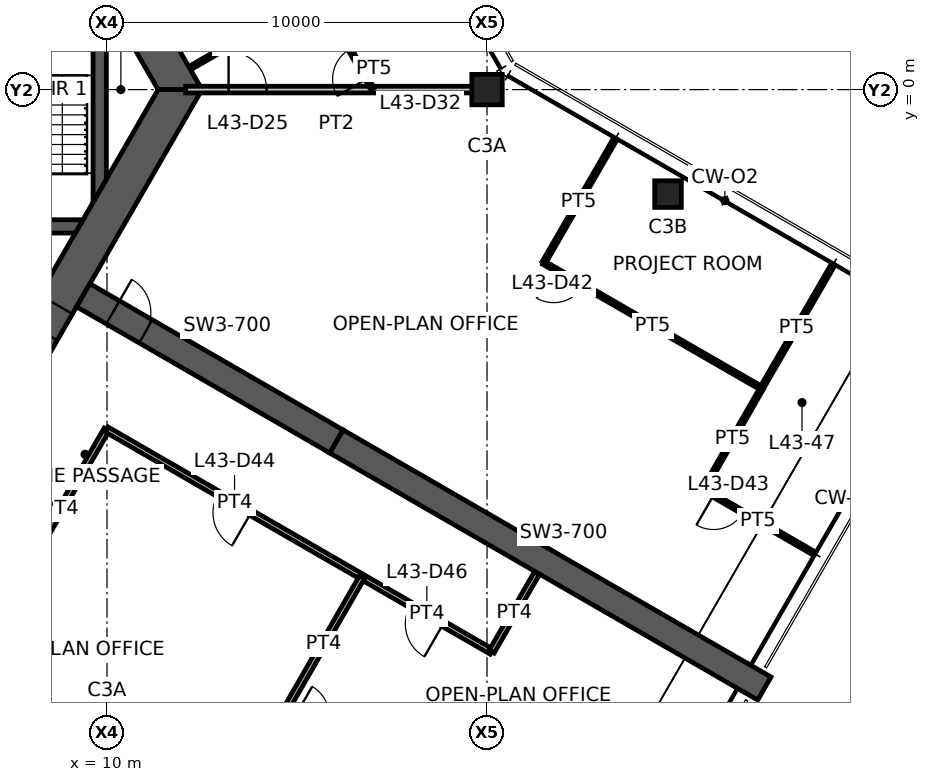
"""IFC4 building model, lengths in metres.
Left out: names, types, materials, properties, quantities, classifications, styles, units other than length and angle.
Written with IfcOpenShell. Run it as: python <this file> out.ifc"""

import sys

from ifc_helpers import new_model, si_unit, direction, frame, frame_2d, origin, origin_2d, place, context, subcontext, project, spatial, polyline, rectangle, hollow_rectangle, outline, extrude, element, fill, save


model = new_model("IFC4")
c1 = context("Model", 3, precision=1e-05, world=origin(), true_north=direction((0.0, 1.0)))
c2 = subcontext(c1, "Body", "Model", "MODEL_VIEW")
j1 = project(units=[si_unit("LENGTHUNIT", "METRE"), si_unit("PLANEANGLEUNIT", "RADIAN")], contexts=[c1])
p1 = place(None, origin())
s1 = spatial("IfcSite", under=j1, at=p1, CompositionType="ELEMENT")
p2 = place(p1, origin())
s2 = spatial("IfcBuilding", under=s1, at=p2, CompositionType="ELEMENT")
p3 = place(p2, frame((0.0, 0.0, 172.1)))
s3 = spatial("IfcBuildingStorey", under=s2, at=p3, CompositionType="ELEMENT", Elevation=172.1)
p4 = place(p3, frame((20.0, 0.0, 0.0), z_axis=(0.0, 0.0, 1.0), x_axis=(1.0, 0.0, 0.0)))
e1 = element("IfcColumn", 1, at=p4, inside=s3, PredefinedType="COLUMN", context=c2, shape_type="SweptSolid", body=[
    extrude(hollow_rectangle(XDim=0.8, YDim=0.8, WallThickness=0.045, at=origin_2d()), origin(), (0.0, 0.0, 1.0), 3.9),
])
p5 = place(p3, frame((24.763, -2.75, 0.0), z_axis=(0.0, 0.0, 1.0), x_axis=(1.0, 0.0, 0.0)))
e2 = element("IfcColumn", 2, at=p5, inside=s3, PredefinedType="COLUMN", context=c2, shape_type="SweptSolid", body=[
    extrude(hollow_rectangle(XDim=0.7, YDim=0.7, WallThickness=0.036, at=origin_2d()), origin(), (0.0, 0.0, 1.0), 3.9),
])
p6 = place(p3, frame((11.922, 0.0, 0.0), z_axis=(0.0, 0.0, 1.0), x_axis=(-0.500004296715, 0.866022923061, 0.0)))
e3 = element("IfcWall", 3, at=p6, inside=s3, PredefinedType="SHEAR", context=c2, shape_type="SweptSolid", body=[
    extrude(outline(polyline([(-0.289, -0.5), (5.835, -0.5), (6.635, -0.5), (12.211, -0.5), (11.634, 0.5), (6.635, 0.5), (5.835, 0.5), (0.289, 0.5), (-0.289, -0.5)])), origin(), (0.0, 0.0, 1.0), 3.9),
])
p7 = place(p6, frame((5.835, 0.0, 0.0)))
e4 = element("IfcOpeningElement", 4, at=p7, cuts=e3, PredefinedType="OPENING", context=c2, shape_type="SweptSolid", body=[
    extrude(rectangle(XDim=0.8, YDim=2.1, at=frame_2d((0.4, 1.05))), frame((0.0, 0.51, 0.0), z_axis=(0.0, -1.0, 0.0), x_axis=(1.0, 0.0, 0.0)), (0.0, 0.0, 1.0), 1.02),
])
p8 = place(p3, frame((5.961, -10.325, 0.0), z_axis=(0.0, 0.0, 1.0), x_axis=(0.500004296715, 0.866022923061, 0.0)))
e5 = element("IfcWall", 5, at=p8, inside=s3, PredefinedType="SHEAR", context=c2, shape_type="SweptSolid", body=[
    extrude(outline(polyline([(-0.289, -0.5), (4.594, -0.5), (5.394, -0.5), (12.211, -0.5), (11.634, 0.5), (5.394, 0.5), (4.594, 0.5), (0.289, 0.5), (-0.289, -0.5)])), origin(), (0.0, 0.0, 1.0), 3.9),
])
p9 = place(p8, frame((4.594, 0.0, 0.0)))
e6 = element("IfcOpeningElement", 6, at=p9, cuts=e5, PredefinedType="OPENING", context=c2, shape_type="SweptSolid", body=[
    extrude(rectangle(XDim=0.8, YDim=2.1, at=frame_2d((0.4, 1.05))), frame((0.0, 0.51, 0.0), z_axis=(0.0, -1.0, 0.0), x_axis=(1.0, 0.0, 0.0)), (0.0, 0.0, 1.0), 1.02),
])
p10 = place(p3, frame((9.375, -5.413, 0.0), z_axis=(0.0, 0.0, 1.0), x_axis=(0.866032377459, -0.499987921047, 0.0)))
e7 = element("IfcWall", 7, at=p10, inside=s3, PredefinedType="SHEAR", context=c2, shape_type="SweptSolid", body=[
    extrude(rectangle(XDim=7.696, YDim=0.7, at=frame_2d((3.848, 0.0))), origin(), (0.0, 0.0, 1.0), 3.9),
])
p11 = place(p10, frame((0.9, 0.0, 0.0)))
e8 = element("IfcOpeningElement", 8, at=p11, cuts=e7, PredefinedType="OPENING", context=c2, shape_type="SweptSolid", body=[
    extrude(rectangle(XDim=1.0, YDim=2.1, at=frame_2d((0.5, 1.05))), frame((0.0, 0.36, 0.0), z_axis=(0.0, -1.0, 0.0), x_axis=(1.0, 0.0, 0.0)), (0.0, 0.0, 1.0), 0.72),
])
p12 = place(p3, frame((16.039, -9.26, 0.0), z_axis=(0.0, 0.0, 1.0), x_axis=(0.866024837091, -0.50000098154, 0.0)))
e9 = element("IfcWall", 9, at=p12, inside=s3, PredefinedType="SHEAR", context=c2, shape_type="SweptSolid", body=[
    extrude(rectangle(XDim=13.0, YDim=0.7, at=frame_2d((6.5, 0.0))), origin(), (0.0, 0.0, 1.0), 3.9),
])
p13 = place(p3, frame((1.425, -3.6, 0.0), z_axis=(0.0, 0.0, 1.0), x_axis=(1.0, 0.0, 0.0)))
e10 = element("IfcWall", 10, at=p13, inside=s3, PredefinedType="SHEAR", context=c2, shape_type="SweptSolid", body=[
    extrude(outline(polyline([(0.0, -0.175), (1.075, -0.175), (2.175, -0.175), (7.74, -0.175), (7.942, 0.175), (2.175, 0.175), (1.075, 0.175), (0.0, 0.175), (0.0, -0.175)])), origin(), (0.0, 0.0, 1.0), 3.9),
])
p14 = place(p13, frame((1.075, 0.0, 0.0)))
e11 = element("IfcOpeningElement", 11, at=p14, cuts=e10, PredefinedType="OPENING", context=c2, shape_type="SweptSolid", body=[
    extrude(rectangle(XDim=1.1, YDim=2.1, at=frame_2d((0.55, 1.05))), frame((0.0, 0.185, 0.0), z_axis=(0.0, -1.0, 0.0), x_axis=(1.0, 0.0, 0.0)), (0.0, 0.0, 1.0), 0.37),
])
p15 = place(p3, frame((9.808, -2.662, 0.0), z_axis=(0.0, 0.0, 1.0), x_axis=(0.0, 1.0, 0.0)))
e12 = element("IfcWall", 12, at=p15, inside=s3, PredefinedType="SHEAR", context=c2, shape_type="SweptSolid", body=[
    extrude(outline(polyline([(0.303, -0.175), (5.021, -0.175), (5.628, 0.175), (-0.303, 0.175), (0.303, -0.175)])), origin(), (0.0, 0.0, 1.0), 3.9),
])
p16 = place(p3, frame((12.07, 0.0, 0.0), z_axis=(0.0, 0.0, 1.0), x_axis=(1.0, 0.0, 0.0)))
e13 = element("IfcWall", 13, at=p16, inside=s3, PredefinedType="PARTITIONING", context=c2, shape_type="SweptSolid", body=[
    extrude(rectangle(XDim=7.93, YDim=0.175, at=frame_2d((3.965, 0.0))), origin(), (0.0, 0.0, 1.0), 3.05),
])
p17 = place(p16, frame((1.13, 0.0, 0.0)))
e14 = element("IfcOpeningElement", 14, at=p17, cuts=e13, PredefinedType="OPENING", context=c2, shape_type="SweptSolid", body=[
    extrude(rectangle(XDim=1.0, YDim=2.1, at=frame_2d((0.5, 1.05))), frame((0.0, 0.098, 0.0), z_axis=(0.0, -1.0, 0.0), x_axis=(1.0, 0.0, 0.0)), (0.0, 0.0, 1.0), 0.195),
])
p18 = place(p3, frame((14.427, 1.863, 0.0), z_axis=(0.0, 0.0, 1.0), x_axis=(-0.866045356598, -0.49996543912, 0.0)))
e15 = element("IfcWall", 15, at=p18, inside=s3, PredefinedType="PARTITIONING", context=c2, shape_type="SweptSolid", body=[
    extrude(rectangle(XDim=2.58, YDim=0.1, at=frame_2d((1.29, 0.0))), origin(), (0.0, 0.0, 1.0), 2.95),
])
p19 = place(p3, frame((16.986, 0.02, 0.0), z_axis=(0.0, 0.0, 1.0), x_axis=(-0.498096123952, 0.867121820337, 0.0)))
e16 = element("IfcWall", 16, at=p19, inside=s3, PredefinedType="PARTITIONING", context=c2, shape_type="SweptSolid", body=[
    extrude(rectangle(XDim=2.067, YDim=0.1, at=frame_2d((1.034, 0.0))), origin(), (0.0, 0.0, 1.0), 2.95),
])
p20 = place(p19, frame((0.3, 0.0, 0.0)))
e17 = element("IfcOpeningElement", 17, at=p20, cuts=e16, PredefinedType="OPENING", context=c2, shape_type="SweptSolid", body=[
    extrude(rectangle(XDim=0.9, YDim=2.1, at=frame_2d((0.45, 1.05))), frame((0.0, 0.06, 0.0), z_axis=(0.0, -1.0, 0.0), x_axis=(1.0, 0.0, 0.0)), (0.0, 0.0, 1.0), 0.12),
])
p21 = place(p3, frame((29.077, -4.658, 0.0), z_axis=(0.0, 0.0, 1.0), x_axis=(-0.501275229052, -0.865287897026, 0.0)))
e18 = element("IfcWall", 18, at=p21, inside=s3, PredefinedType="PARTITIONING", context=c2, shape_type="SweptSolid", body=[
    extrude(rectangle(XDim=3.705, YDim=0.1, at=frame_2d((1.853, 0.0))), origin(), (0.0, 0.0, 1.0), 2.95),
])
p22 = place(p3, frame((21.492, -4.557, 0.0), z_axis=(0.0, 0.0, 1.0), x_axis=(0.500013413428, 0.866017659399, 0.0)))
e19 = element("IfcWall", 19, at=p22, inside=s3, PredefinedType="PARTITIONING", context=c2, shape_type="SweptSolid", body=[
    extrude(rectangle(XDim=3.68, YDim=0.1, at=frame_2d((1.84, 0.0))), origin(), (0.0, 0.0, 1.0), 2.95),
])
p23 = place(p3, frame((27.227, -7.863, 0.0), z_axis=(0.0, 0.0, 1.0), x_axis=(-0.866343956507, 0.499447844147, 0.0)))
e20 = element("IfcWall", 20, at=p23, inside=s3, PredefinedType="PARTITIONING", context=c2, shape_type="SweptSolid", body=[
    extrude(rectangle(XDim=6.62, YDim=0.1, at=frame_2d((3.31, 0.0))), origin(), (0.0, 0.0, 1.0), 2.95),
])
p24 = place(p23, frame((5.42, 0.0, 0.0)))
e21 = element("IfcOpeningElement", 21, at=p24, cuts=e20, PredefinedType="OPENING", context=c2, shape_type="SweptSolid", body=[
    extrude(rectangle(XDim=0.9, YDim=2.1, at=frame_2d((0.45, 1.05))), frame((0.0, 0.06, 0.0), z_axis=(0.0, -1.0, 0.0), x_axis=(1.0, 0.0, 0.0)), (0.0, 0.0, 1.0), 0.12),
])
p25 = place(p3, frame((25.7, -10.527, 0.0), z_axis=(0.0, 0.0, 1.0), x_axis=(0.497097650811, 0.867694603855, 0.0)))
e22 = element("IfcWall", 22, at=p25, inside=s3, PredefinedType="PARTITIONING", context=c2, shape_type="SweptSolid", body=[
    extrude(rectangle(XDim=3.071, YDim=0.1, at=frame_2d((1.535, 0.0))), origin(), (0.0, 0.0, 1.0), 2.95),
])
p26 = place(p3, frame((28.562, -12.18, 0.0), z_axis=(0.0, 0.0, 1.0), x_axis=(-0.866020751647, 0.500008057651, 0.0)))
e23 = element("IfcWall", 23, at=p26, inside=s3, PredefinedType="PARTITIONING", context=c2, shape_type="SweptSolid", body=[
    extrude(rectangle(XDim=3.305, YDim=0.1, at=frame_2d((1.653, 0.0))), origin(), (0.0, 0.0, 1.0), 2.95),
])
p27 = place(p26, frame((2.105, 0.0, 0.0)))
e24 = element("IfcOpeningElement", 24, at=p27, cuts=e23, PredefinedType="OPENING", context=c2, shape_type="SweptSolid", body=[
    extrude(rectangle(XDim=0.9, YDim=2.1, at=frame_2d((0.45, 1.05))), frame((0.0, 0.06, 0.0), z_axis=(0.0, -1.0, 0.0), x_axis=(1.0, 0.0, 0.0)), (0.0, 0.0, 1.0), 0.12),
])
p28 = place(p3, frame((9.992, -8.944, 0.0), z_axis=(0.0, 0.0, 1.0), x_axis=(-0.500033248206, -0.866006207073, 0.0)))
e25 = element("IfcWall", 25, at=p28, inside=s3, PredefinedType="PARTITIONING", context=c2, shape_type="SweptSolid", body=[
    extrude(rectangle(XDim=4.828, YDim=0.15, at=frame_2d((2.414, 0.0))), origin(), (0.0, 0.0, 1.0), 2.95),
])
p29 = place(p3, frame((16.721, -12.83, 0.0), z_axis=(0.0, 0.0, 1.0), x_axis=(-0.866020780657, 0.500008007406, 0.0)))
e26 = element("IfcWall", 26, at=p29, inside=s3, PredefinedType="PARTITIONING", context=c2, shape_type="SweptSolid", body=[
    extrude(rectangle(XDim=7.771, YDim=0.15, at=frame_2d((3.885, 0.0))), origin(), (0.0, 0.0, 1.0), 2.95),
])
p30 = place(p29, frame((3.385, 0.0, 0.0)))
e27 = element("IfcOpeningElement", 27, at=p30, cuts=e26, PredefinedType="OPENING", context=c2, shape_type="SweptSolid", body=[
    extrude(rectangle(XDim=1.0, YDim=2.1, at=frame_2d((0.5, 1.05))), frame((0.0, 0.085, 0.0), z_axis=(0.0, -1.0, 0.0), x_axis=(1.0, 0.0, 0.0)), (0.0, 0.0, 1.0), 0.17),
])
p31 = place(p3, frame((20.12, -14.792, 0.0), z_axis=(0.0, 0.0, 1.0), x_axis=(-0.866038848349, 0.499976712608, 0.0)))
e28 = element("IfcWall", 28, at=p31, inside=s3, PredefinedType="PARTITIONING", context=c2, shape_type="SweptSolid", body=[
    extrude(rectangle(XDim=3.934, YDim=0.15, at=frame_2d((1.967, 0.0))), origin(), (0.0, 0.0, 1.0), 2.95),
])
p32 = place(p31, frame((1.467, 0.0, 0.0)))
e29 = element("IfcOpeningElement", 29, at=p32, cuts=e28, PredefinedType="OPENING", context=c2, shape_type="SweptSolid", body=[
    extrude(rectangle(XDim=1.0, YDim=2.1, at=frame_2d((0.5, 1.05))), frame((0.0, 0.085, 0.0), z_axis=(0.0, -1.0, 0.0), x_axis=(1.0, 0.0, 0.0)), (0.0, 0.0, 1.0), 0.17),
])
p33 = place(p3, frame((21.31, -12.731, 0.0), z_axis=(0.0, 0.0, 1.0), x_axis=(-0.500077627542, -0.865980580863, 0.0)))
e30 = element("IfcWall", 30, at=p33, inside=s3, PredefinedType="PARTITIONING", context=c2, shape_type="SweptSolid", body=[
    extrude(rectangle(XDim=2.38, YDim=0.15, at=frame_2d((1.19, 0.0))), origin(), (0.0, 0.0, 1.0), 2.95),
])
p34 = place(p3, frame((16.713, -12.825, 0.0), z_axis=(0.0, 0.0, 1.0), x_axis=(-0.498976779382, -0.866615355067, 0.0)))
e31 = element("IfcWall", 31, at=p34, inside=s3, PredefinedType="PARTITIONING", context=c2, shape_type="SweptSolid", body=[
    extrude(rectangle(XDim=4.054, YDim=0.15, at=frame_2d((2.027, 0.0))), origin(), (0.0, 0.0, 1.0), 2.95),
])
p35 = place(p9, origin())
e32 = element("IfcDoor", 32, at=p35, inside=s3, OperationType="SINGLE_SWING_LEFT", PredefinedType="DOOR", context=c2, shape_type="SweptSolid", body=[
    extrude(rectangle(XDim=0.8, YDim=2.1, at=frame_2d((0.4, 1.05))), frame((0.0, 0.025, 0.0), z_axis=(0.0, -1.0, 0.0), x_axis=(1.0, 0.0, 0.0)), (0.0, 0.0, 1.0), 0.05),
])
fill(e6, e32)
p36 = place(p11, origin())
e33 = element("IfcDoor", 33, at=p36, inside=s3, OperationType="SINGLE_SWING_LEFT", PredefinedType="DOOR", context=c2, shape_type="SweptSolid", body=[
    extrude(rectangle(XDim=1.0, YDim=2.1, at=frame_2d((0.5, 1.05))), frame((0.0, 0.025, 0.0), z_axis=(0.0, -1.0, 0.0), x_axis=(1.0, 0.0, 0.0)), (0.0, 0.0, 1.0), 0.05),
])
fill(e8, e33)
p37 = place(p17, origin())
e34 = element("IfcDoor", 34, at=p37, inside=s3, OperationType="SINGLE_SWING_LEFT", PredefinedType="DOOR", context=c2, shape_type="SweptSolid", body=[
    extrude(rectangle(XDim=1.0, YDim=2.1, at=frame_2d((0.5, 1.05))), frame((0.0, 0.025, 0.0), z_axis=(0.0, -1.0, 0.0), x_axis=(1.0, 0.0, 0.0)), (0.0, 0.0, 1.0), 0.05),
])
fill(e14, e34)
p38 = place(p20, origin())
e35 = element("IfcDoor", 35, at=p38, inside=s3, OperationType="SINGLE_SWING_LEFT", PredefinedType="DOOR", context=c2, shape_type="SweptSolid", body=[
    extrude(rectangle(XDim=0.9, YDim=2.1, at=frame_2d((0.45, 1.05))), frame((0.0, 0.025, 0.0), z_axis=(0.0, -1.0, 0.0), x_axis=(1.0, 0.0, 0.0)), (0.0, 0.0, 1.0), 0.05),
])
fill(e17, e35)
p39 = place(p24, origin())
e36 = element("IfcDoor", 36, at=p39, inside=s3, OperationType="SINGLE_SWING_RIGHT", PredefinedType="DOOR", context=c2, shape_type="SweptSolid", body=[
    extrude(rectangle(XDim=0.9, YDim=2.1, at=frame_2d((0.45, 1.05))), frame((0.0, 0.025, 0.0), z_axis=(0.0, -1.0, 0.0), x_axis=(1.0, 0.0, 0.0)), (0.0, 0.0, 1.0), 0.05),
])
fill(e21, e36)
p40 = place(p27, origin())
e37 = element("IfcDoor", 37, at=p40, inside=s3, OperationType="SINGLE_SWING_RIGHT", PredefinedType="DOOR", context=c2, shape_type="SweptSolid", body=[
    extrude(rectangle(XDim=0.9, YDim=2.1, at=frame_2d((0.45, 1.05))), frame((0.0, 0.025, 0.0), z_axis=(0.0, -1.0, 0.0), x_axis=(1.0, 0.0, 0.0)), (0.0, 0.0, 1.0), 0.05),
])
fill(e24, e37)
p41 = place(p30, origin())
e38 = element("IfcDoor", 38, at=p41, inside=s3, OperationType="SINGLE_SWING_LEFT", PredefinedType="DOOR", context=c2, shape_type="SweptSolid", body=[
    extrude(rectangle(XDim=1.0, YDim=2.1, at=frame_2d((0.5, 1.05))), frame((0.0, 0.025, 0.0), z_axis=(0.0, -1.0, 0.0), x_axis=(1.0, 0.0, 0.0)), (0.0, 0.0, 1.0), 0.05),
])
fill(e27, e38)
p42 = place(p32, origin())
e39 = element("IfcDoor", 39, at=p42, inside=s3, OperationType="SINGLE_SWING_LEFT", PredefinedType="DOOR", context=c2, shape_type="SweptSolid", body=[
    extrude(rectangle(XDim=1.0, YDim=2.1, at=frame_2d((0.5, 1.05))), frame((0.0, 0.025, 0.0), z_axis=(0.0, -1.0, 0.0), x_axis=(1.0, 0.0, 0.0)), (0.0, 0.0, 1.0), 0.05),
])
fill(e29, e39)
save(model, sys.argv[1])
